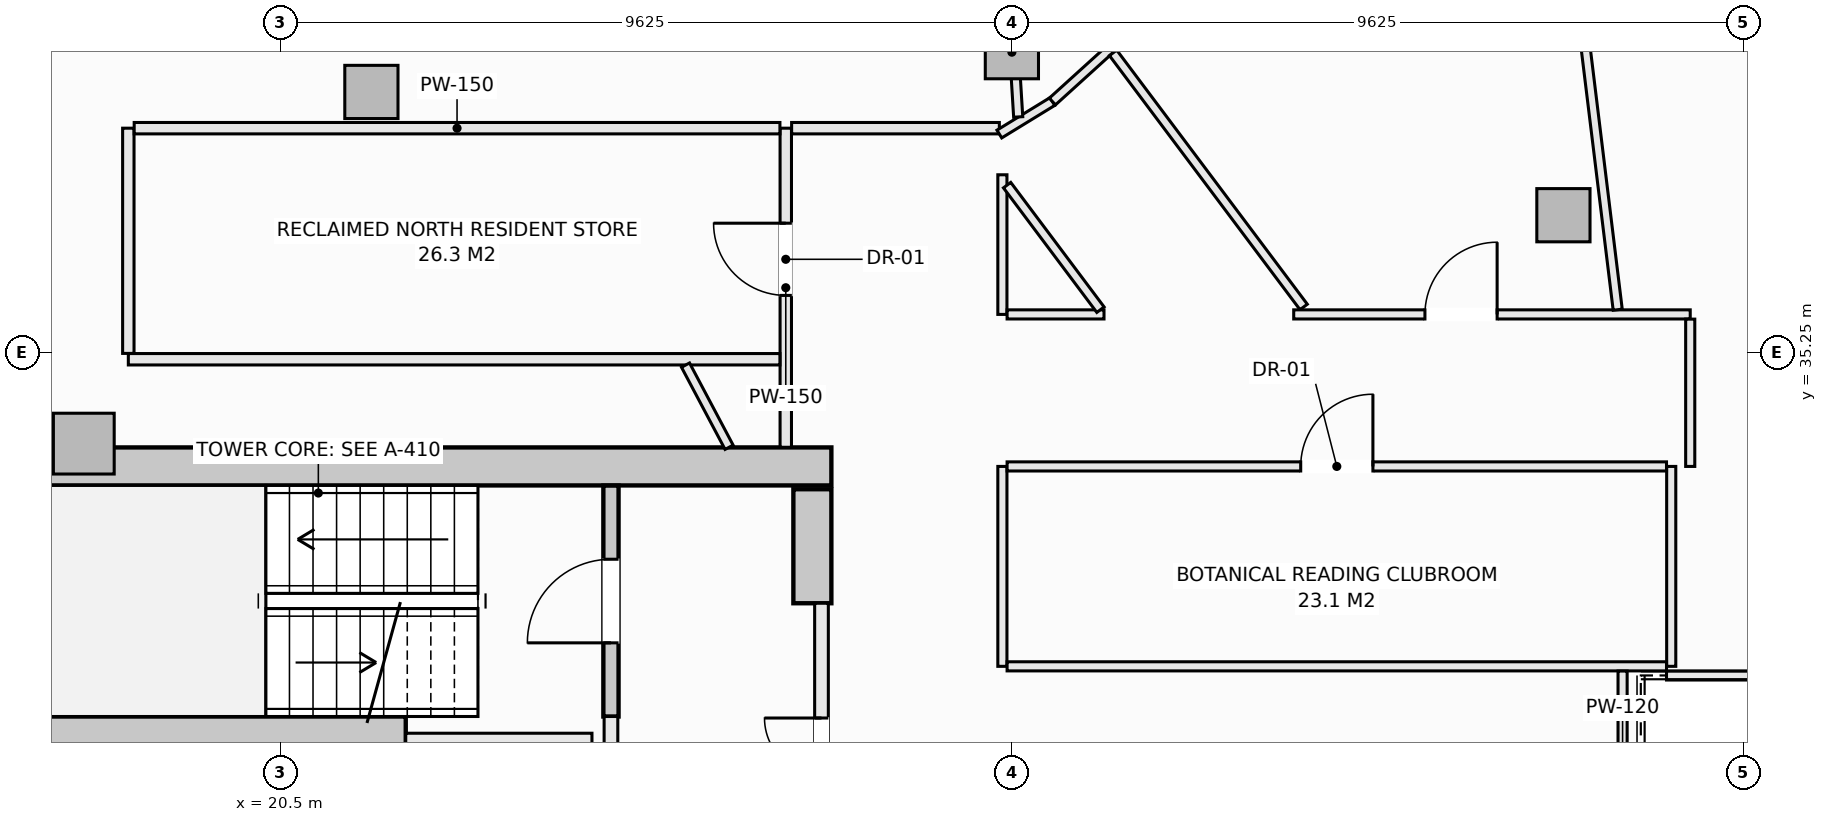
"""IFC4 building model, lengths in metres.
Left out: names, types, materials, properties, quantities, classifications, styles, units other than length and angle.
Written with IfcOpenShell. Run it as: python <this file> out.ifc"""

import sys

from ifc_helpers import new_model, si_unit, direction, frame, frame_2d, origin, origin_2d, place, context, subcontext, project, spatial, rectangle, extrude, element, fill, save


model = new_model("IFC4")
c1 = context("Model", 3, precision=1e-05, world=origin(), true_north=direction((0.0, 1.0)))
c2 = subcontext(c1, "Body", "Model", "MODEL_VIEW")
j1 = project(units=[si_unit("LENGTHUNIT", "METRE"), si_unit("PLANEANGLEUNIT", "RADIAN")], contexts=[c1])
p1 = place(None, origin())
s1 = spatial("IfcSite", under=j1, at=p1, CompositionType="ELEMENT")
p2 = place(p1, origin())
s2 = spatial("IfcBuilding", under=s1, at=p2, CompositionType="ELEMENT")
p3 = place(p2, frame((0.0, 0.0, 209.6)))
s3 = spatial("IfcBuildingStorey", under=s2, at=p3, CompositionType="ELEMENT", Elevation=209.6)
p4 = place(p3, frame((14.25, 33.75, -0.27), z_axis=(0.0, 0.0, 1.0), x_axis=(1.0, 0.0, 0.0)))
e1 = element("IfcWall", 1, at=p4, inside=s3, PredefinedType="SHEAR", context=c2, shape_type="SweptSolid", body=[
    extrude(rectangle(XDim=13.5, YDim=0.5, at=frame_2d((6.75, 0.0))), origin(), (0.0, 0.0, 1.0), 3.3),
])
p5 = place(p3, frame((27.5, 31.95, -0.27), z_axis=(0.0, 0.0, 1.0), x_axis=(0.0, 1.0, 0.0)))
e2 = element("IfcWall", 2, at=p5, inside=s3, PredefinedType="SHEAR", context=c2, shape_type="SweptSolid", body=[
    extrude(rectangle(XDim=1.5, YDim=0.5, at=frame_2d((0.75, 0.0))), origin(), (0.0, 0.0, 1.0), 3.3),
])
p6 = place(p3, frame((14.85, 30.25, -0.27), z_axis=(0.0, 0.0, 1.0), x_axis=(1.0, 0.0, 0.0)))
e3 = element("IfcWall", 3, at=p6, inside=s3, PredefinedType="SHEAR", context=c2, shape_type="SweptSolid", body=[
    extrude(rectangle(XDim=7.3, YDim=0.42, at=frame_2d((3.65, 0.0))), origin(), (0.0, 0.0, 1.0), 3.3),
])
for number, where, z_axis, x_axis in (
    (4, (37.382, 37.055, -0.27), (0.0, 0.0, 1.0), (1.0, 0.0, 0.0)),
    (5, (30.125, 39.2, -0.27), (0.0, 0.0, 1.0), (1.0, 0.0, 0.0)),
    (6, (21.698, 38.677, -0.27), (0.0, 0.0, 1.0), (1.0, 0.0, 0.0)),
):
    element("IfcColumn", number, at=place(p3, frame(where, z_axis=z_axis, x_axis=x_axis)), inside=s3, PredefinedType="COLUMN", context=c2, shape_type="SweptSolid", body=[
        extrude(rectangle(XDim=0.7, YDim=0.7, at=origin_2d()), origin(), (0.0, 0.0, 1.0), 3.3),
    ])
p7 = place(p3, frame((17.914, 34.05, -0.27), z_axis=(0.0, 0.0, 1.0), x_axis=(1.0, 0.0, 0.0)))
e7 = element("IfcColumn", 7, at=p7, inside=s3, PredefinedType="PILASTER", context=c2, shape_type="SweptSolid", body=[
    extrude(rectangle(XDim=0.8, YDim=0.8, at=origin_2d()), origin(), (0.0, 0.0, 1.0), 3.3),
])
p8 = place(p3, frame((24.85, 30.46, -0.27), z_axis=(0.0, 0.0, 1.0), x_axis=(0.0, 1.0, 0.0)))
e8 = element("IfcWall", 8, at=p8, inside=s3, PredefinedType="SHEAR", context=c2, shape_type="SweptSolid", body=[
    extrude(rectangle(XDim=3.038, YDim=0.2, at=frame_2d((1.519, 0.0))), origin(), (0.0, 0.0, 1.0), 3.3),
])
p9 = place(p8, frame((0.969, 0.0, 0.27)))
e9 = element("IfcOpeningElement", 9, at=p9, cuts=e8, PredefinedType="OPENING", context=c2, shape_type="SweptSolid", body=[
    extrude(rectangle(XDim=1.1, YDim=2.15, at=frame_2d((0.55, 1.075))), frame((0.0, 0.11, 0.0), z_axis=(0.0, -1.0, 0.0), x_axis=(1.0, 0.0, 0.0)), (0.0, 0.0, 1.0), 0.22),
])
p10 = place(p3, frame((22.15, 30.14, 0.0), z_axis=(0.0, 0.0, 1.0), x_axis=(1.0, 0.0, 0.0)))
e10 = element("IfcWall", 10, at=p10, inside=s3, PredefinedType="SOLIDWALL", context=c2, shape_type="SweptSolid", body=[
    extrude(rectangle(XDim=2.45, YDim=0.2, at=frame_2d((1.225, 0.0))), origin(), (0.0, 0.0, 1.0), 3.03),
])
p11 = place(p3, frame((24.85, 30.04, 0.0), z_axis=(0.0, 0.0, 1.0), x_axis=(0.0, 1.0, 0.0)))
e11 = element("IfcWall", 11, at=p11, inside=s3, PredefinedType="SOLIDWALL", context=c2, shape_type="SweptSolid", body=[
    extrude(rectangle(XDim=0.42, YDim=0.18, at=frame_2d((0.21, 0.0))), origin(), (0.0, 0.0, 1.0), 3.03),
])
p12 = place(p3, frame((27.62, 22.05, 0.0), z_axis=(0.0, 0.0, 1.0), x_axis=(0.0, 1.0, 0.0)))
e12 = element("IfcWall", 12, at=p12, inside=s3, PredefinedType="SOLIDWALL", context=c2, shape_type="SweptSolid", body=[
    extrude(rectangle(XDim=9.9, YDim=0.18, at=frame_2d((4.95, 0.0))), origin(), (0.0, 0.0, 1.0), 3.03),
])
p13 = place(p12, frame((4.475, 0.0, 0.0)))
e13 = element("IfcOpeningElement", 13, at=p13, cuts=e12, PredefinedType="OPENING", context=c2, shape_type="SweptSolid", body=[
    extrude(rectangle(XDim=0.95, YDim=2.1, at=frame_2d((0.475, 1.05))), frame((0.0, 0.1, 0.0), z_axis=(0.0, -1.0, 0.0), x_axis=(1.0, 0.0, 0.0)), (0.0, 0.0, 1.0), 0.2),
])
p14 = place(p12, frame((6.89, 0.0, 0.0)))
e14 = element("IfcOpeningElement", 14, at=p14, cuts=e12, PredefinedType="OPENING", context=c2, shape_type="SweptSolid", body=[
    extrude(rectangle(XDim=1.5, YDim=2.2, at=frame_2d((0.75, 1.1))), frame((0.0, 0.1, 0.0), z_axis=(0.0, -1.0, 0.0), x_axis=(1.0, 0.0, 0.0)), (0.0, 0.0, 1.0), 0.2),
])
p15 = place(p12, frame((1.51, 0.0, 0.0)))
e15 = element("IfcOpeningElement", 15, at=p15, cuts=e12, PredefinedType="OPENING", context=c2, shape_type="SweptSolid", body=[
    extrude(rectangle(XDim=1.5, YDim=2.2, at=frame_2d((0.75, 1.1))), frame((0.0, 0.1, 0.0), z_axis=(0.0, -1.0, 0.0), x_axis=(1.0, 0.0, 0.0)), (0.0, 0.0, 1.0), 0.2),
])
p16 = place(p3, frame((27.15, 34.002, 0.0), z_axis=(0.0, 0.0, 1.0), x_axis=(0.0, 1.0, 0.0)))
e16 = element("IfcWall", 16, at=p16, inside=s3, PredefinedType="PARTITIONING", context=c2, shape_type="SweptSolid", body=[
    extrude(rectangle(XDim=4.198, YDim=0.15, at=frame_2d((2.099, 0.0))), origin(), (0.0, 0.0, 1.0), 3.03),
])
p17 = place(p16, frame((1.998, 0.0, 0.0)))
e17 = element("IfcOpeningElement", 17, at=p17, cuts=e16, PredefinedType="OPENING", context=c2, shape_type="SweptSolid", body=[
    extrude(rectangle(XDim=0.95, YDim=2.1, at=frame_2d((0.475, 1.05))), frame((0.0, 0.085, 0.0), z_axis=(0.0, -1.0, 0.0), x_axis=(1.0, 0.0, 0.0)), (0.0, 0.0, 1.0), 0.17),
])
p18 = place(p3, frame((30.0, 31.12, 0.0), z_axis=(0.0, 0.0, 1.0), x_axis=(0.0, 1.0, 0.0)))
e18 = element("IfcWall", 18, at=p18, inside=s3, PredefinedType="PARTITIONING", context=c2, shape_type="SweptSolid", body=[
    extrude(rectangle(XDim=2.63, YDim=0.12, at=frame_2d((1.315, 0.0))), origin(), (0.0, 0.0, 1.0), 3.03),
])
p19 = place(p3, frame((30.0, 35.75, 0.0), z_axis=(0.0, 0.0, 1.0), x_axis=(0.0, 1.0, 0.0)))
e19 = element("IfcWall", 19, at=p19, inside=s3, PredefinedType="PARTITIONING", context=c2, shape_type="SweptSolid", body=[
    extrude(rectangle(XDim=1.837, YDim=0.12, at=frame_2d((0.918, 0.0))), origin(), (0.0, 0.0, 1.0), 3.03),
])
p20 = place(p3, frame((38.8, 31.12, 0.0), z_axis=(0.0, 0.0, 1.0), x_axis=(0.0, 1.0, 0.0)))
e20 = element("IfcWall", 20, at=p20, inside=s3, PredefinedType="PARTITIONING", context=c2, shape_type="SweptSolid", body=[
    extrude(rectangle(XDim=2.63, YDim=0.12, at=frame_2d((1.315, 0.0))), origin(), (0.0, 0.0, 1.0), 3.03),
])
p21 = place(p3, frame((30.062, 31.12, 0.0), z_axis=(0.0, 0.0, 1.0), x_axis=(1.0, 0.0, 0.0)))
e21 = element("IfcWall", 21, at=p21, inside=s3, PredefinedType="PARTITIONING", context=c2, shape_type="SweptSolid", body=[
    extrude(rectangle(XDim=8.676, YDim=0.12, at=frame_2d((4.338, 0.0))), origin(), (0.0, 0.0, 1.0), 3.03),
])
p22 = place(p3, frame((30.062, 33.75, 0.0), z_axis=(0.0, 0.0, 1.0), x_axis=(1.0, 0.0, 0.0)))
e22 = element("IfcWall", 22, at=p22, inside=s3, PredefinedType="PARTITIONING", context=c2, shape_type="SweptSolid", body=[
    extrude(rectangle(XDim=8.676, YDim=0.12, at=frame_2d((4.338, 0.0))), origin(), (0.0, 0.0, 1.0), 3.03),
])
p23 = place(p22, frame((3.863, 0.0, 0.0)))
e23 = element("IfcOpeningElement", 23, at=p23, cuts=e22, PredefinedType="OPENING", context=c2, shape_type="SweptSolid", body=[
    extrude(rectangle(XDim=0.95, YDim=2.1, at=frame_2d((0.475, 1.05))), frame((0.0, 0.07, 0.0), z_axis=(0.0, -1.0, 0.0), x_axis=(1.0, 0.0, 0.0)), (0.0, 0.0, 1.0), 0.14),
])
p24 = place(p3, frame((18.5, 35.16, 0.0), z_axis=(0.0, 0.0, 1.0), x_axis=(1.0, 0.0, 0.0)))
e24 = element("IfcWall", 24, at=p24, inside=s3, PredefinedType="PARTITIONING", context=c2, shape_type="SweptSolid", body=[
    extrude(rectangle(XDim=8.573, YDim=0.15, at=frame_2d((4.287, 0.0))), origin(), (0.0, 0.0, 1.0), 3.03),
])
p25 = place(p3, frame((18.5, 35.237, 0.0), z_axis=(0.0, 0.0, 1.0), x_axis=(0.0, 1.0, 0.0)))
e25 = element("IfcWall", 25, at=p25, inside=s3, PredefinedType="PARTITIONING", context=c2, shape_type="SweptSolid", body=[
    extrude(rectangle(XDim=2.963, YDim=0.15, at=frame_2d((1.481, 0.0))), origin(), (0.0, 0.0, 1.0), 3.03),
])
p26 = place(p3, frame((18.577, 38.2, 0.0), z_axis=(0.0, 0.0, 1.0), x_axis=(1.0, 0.0, 0.0)))
e26 = element("IfcWall", 26, at=p26, inside=s3, PredefinedType="PARTITIONING", context=c2, shape_type="SweptSolid", body=[
    extrude(rectangle(XDim=8.496, YDim=0.15, at=frame_2d((4.248, 0.0))), origin(), (0.0, 0.0, 1.0), 3.03),
])
p27 = place(p3, frame((27.227, 38.2, 0.0), z_axis=(0.0, 0.0, 1.0), x_axis=(1.0, 0.0, 0.0)))
e27 = element("IfcWall", 27, at=p27, inside=s3, PredefinedType="PARTITIONING", context=c2, shape_type="SweptSolid", body=[
    extrude(rectangle(XDim=2.733, YDim=0.15, at=frame_2d((1.366, 0.0))), origin(), (0.0, 0.0, 1.0), 3.03),
])
p28 = place(p3, frame((29.96, 38.123, 0.0), z_axis=(0.0, 0.0, 1.0), x_axis=(0.852506956574, 0.522715877885, 0.0)))
e28 = element("IfcWall", 28, at=p28, inside=s3, PredefinedType="PARTITIONING", context=c2, shape_type="SweptSolid", body=[
    extrude(rectangle(XDim=0.819, YDim=0.12, at=frame_2d((0.409, 0.0))), origin(), (0.0, 0.0, 1.0), 3.03),
])
p29 = place(p3, frame((30.658, 38.551, 0.0), z_axis=(0.0, 0.0, 1.0), x_axis=(0.74084279818, 0.671678456097, 0.0)))
e29 = element("IfcWall", 29, at=p29, inside=s3, PredefinedType="PARTITIONING", context=c2, shape_type="SweptSolid", body=[
    extrude(rectangle(XDim=1.027, YDim=0.12, at=frame_2d((0.514, 0.0))), origin(), (0.0, 0.0, 1.0), 3.03),
])
p30 = place(p3, frame((31.456, 39.191, 0.0), z_axis=(0.0, 0.0, 1.0), x_axis=(0.600056078533, -0.799957938029, 0.0)))
e30 = element("IfcWall", 30, at=p30, inside=s3, PredefinedType="PARTITIONING", context=c2, shape_type="SweptSolid", body=[
    extrude(rectangle(XDim=4.179, YDim=0.12, at=frame_2d((2.09, 0.0))), origin(), (0.0, 0.0, 1.0), 2.478),
])
p31 = place(p3, frame((30.062, 35.75, 0.0), z_axis=(0.0, 0.0, 1.0), x_axis=(1.0, 0.0, 0.0)))
e31 = element("IfcWall", 31, at=p31, inside=s3, PredefinedType="PARTITIONING", context=c2, shape_type="SweptSolid", body=[
    extrude(rectangle(XDim=1.275, YDim=0.12, at=frame_2d((0.637, 0.0))), origin(), (0.0, 0.0, 1.0), 3.03),
])
p32 = place(p3, frame((33.833, 35.75, 0.0), z_axis=(0.0, 0.0, 1.0), x_axis=(1.0, 0.0, 0.0)))
e32 = element("IfcWall", 32, at=p32, inside=s3, PredefinedType="PARTITIONING", context=c2, shape_type="SweptSolid", body=[
    extrude(rectangle(XDim=5.217, YDim=0.12, at=frame_2d((2.608, 0.0))), origin(), (0.0, 0.0, 1.0), 2.478),
])
p33 = place(p32, frame((1.726, 0.0, 0.0)))
e33 = element("IfcOpeningElement", 33, at=p33, cuts=e32, PredefinedType="OPENING", context=c2, shape_type="SweptSolid", body=[
    extrude(rectangle(XDim=0.95, YDim=2.1, at=frame_2d((0.475, 1.05))), frame((0.0, 0.07, 0.0), z_axis=(0.0, -1.0, 0.0), x_axis=(1.0, 0.0, 0.0)), (0.0, 0.0, 1.0), 0.14),
])
p34 = place(p3, frame((39.05, 33.75, 0.0), z_axis=(0.0, 0.0, 1.0), x_axis=(0.0, 1.0, 0.0)))
e34 = element("IfcWall", 34, at=p34, inside=s3, PredefinedType="PARTITIONING", context=c2, shape_type="SweptSolid", body=[
    extrude(rectangle(XDim=1.938, YDim=0.12, at=frame_2d((0.969, 0.0))), origin(), (0.0, 0.0, 1.0), 3.03),
])
p35 = place(p3, frame((38.16, 28.997, 0.0), z_axis=(0.0, 0.0, 1.0), x_axis=(0.0, 1.0, 0.0)))
e35 = element("IfcWall", 35, at=p35, inside=s3, PredefinedType="PARTITIONING", context=c2, shape_type="SweptSolid", body=[
    extrude(rectangle(XDim=2.061, YDim=0.12, at=frame_2d((1.031, 0.0))), origin(), (0.0, 0.0, 1.0), 3.03),
])
p36 = place(p3, frame((30.062, 37.451, 0.0), z_axis=(0.0, 0.0, 1.0), x_axis=(0.599790195836, -0.800157310145, 0.0)))
e36 = element("IfcWall", 36, at=p36, inside=s3, PredefinedType="PARTITIONING", context=c2, shape_type="SweptSolid", body=[
    extrude(rectangle(XDim=2.048, YDim=0.12, at=frame_2d((1.024, 0.0))), origin(), (0.0, 0.0, 1.0), 3.03),
])
p37 = place(p3, frame((29.702, 46.603, 0.0), z_axis=(0.0, 0.0, 1.0), x_axis=(0.06113767321, -0.998129342778, 0.0)))
e37 = element("IfcWall", 37, at=p37, inside=s3, PredefinedType="PARTITIONING", context=c2, shape_type="SweptSolid", body=[
    extrude(rectangle(XDim=8.27, YDim=0.12, at=frame_2d((4.135, 0.0))), origin(), (0.0, 0.0, 1.0), 2.712),
])
p38 = place(p3, frame((36.866, 45.854, 0.0), z_axis=(0.0, 0.0, 1.0), x_axis=(0.12152760456, -0.99258805218, 0.0)))
e38 = element("IfcWall", 38, at=p38, inside=s3, PredefinedType="PARTITIONING", context=c2, shape_type="SweptSolid", body=[
    extrude(rectangle(XDim=10.117, YDim=0.12, at=frame_2d((5.059, 0.0))), origin(), (0.0, 0.0, 1.0), 2.478),
])
p39 = place(p3, frame((38.738, 31.0, 0.0), z_axis=(0.0, 0.0, 1.0), x_axis=(1.0, 0.0, 0.0)))
e39 = element("IfcWall", 39, at=p39, inside=s3, PredefinedType="PARTITIONING", context=c2, shape_type="SweptSolid", body=[
    extrude(rectangle(XDim=5.3, YDim=0.12, at=frame_2d((2.65, 0.0))), origin(), (0.0, 0.0, 1.0), 3.03),
])
p40 = place(p3, frame((25.831, 35.083, 0.0), z_axis=(0.0, 0.0, 1.0), x_axis=(0.468630025993, -0.883394531757, 0.0)))
e40 = element("IfcWall", 40, at=p40, inside=s3, PredefinedType="PARTITIONING", context=c2, shape_type="SweptSolid", body=[
    extrude(rectangle(XDim=1.224, YDim=0.12, at=frame_2d((0.612, 0.0))), origin(), (0.0, 0.0, 1.0), 3.03),
])
p41 = place(p9, origin())
e41 = element("IfcDoor", 41, at=p41, inside=s3, OperationType="SINGLE_SWING_LEFT", PredefinedType="DOOR", context=c2, shape_type="SweptSolid", body=[
    extrude(rectangle(XDim=1.1, YDim=2.15, at=frame_2d((0.55, 1.075))), frame((0.0, 0.025, 0.0), z_axis=(0.0, -1.0, 0.0), x_axis=(1.0, 0.0, 0.0)), (0.0, 0.0, 1.0), 0.05),
])
fill(e9, e41)
p42 = place(p14, origin())
e42 = element("IfcDoor", 42, at=p42, inside=s3, OperationType="DOUBLE_DOOR_SINGLE_SWING", PredefinedType="DOOR", context=c2, shape_type="SweptSolid", body=[
    extrude(rectangle(XDim=1.5, YDim=2.2, at=frame_2d((0.75, 1.1))), frame((0.0, 0.025, 0.0), z_axis=(0.0, -1.0, 0.0), x_axis=(1.0, 0.0, 0.0)), (0.0, 0.0, 1.0), 0.05),
])
fill(e14, e42)
p43 = place(p23, origin())
e43 = element("IfcDoor", 43, at=p43, inside=s3, OperationType="SINGLE_SWING_RIGHT", PredefinedType="DOOR", context=c2, shape_type="SweptSolid", body=[
    extrude(rectangle(XDim=0.95, YDim=2.1, at=frame_2d((0.475, 1.05))), frame((0.0, 0.025, 0.0), z_axis=(0.0, -1.0, 0.0), x_axis=(1.0, 0.0, 0.0)), (0.0, 0.0, 1.0), 0.05),
])
fill(e23, e43)
p44 = place(p17, origin())
e44 = element("IfcDoor", 44, at=p44, inside=s3, OperationType="SINGLE_SWING_RIGHT", PredefinedType="DOOR", context=c2, shape_type="SweptSolid", body=[
    extrude(rectangle(XDim=0.95, YDim=2.1, at=frame_2d((0.475, 1.05))), frame((0.0, 0.025, 0.0), z_axis=(0.0, -1.0, 0.0), x_axis=(1.0, 0.0, 0.0)), (0.0, 0.0, 1.0), 0.05),
])
fill(e17, e44)
p45 = place(p33, origin())
e45 = element("IfcDoor", 45, at=p45, inside=s3, OperationType="SINGLE_SWING_RIGHT", PredefinedType="DOOR", context=c2, shape_type="SweptSolid", body=[
    extrude(rectangle(XDim=0.95, YDim=2.1, at=frame_2d((0.475, 1.05))), frame((0.0, 0.025, 0.0), z_axis=(0.0, -1.0, 0.0), x_axis=(1.0, 0.0, 0.0)), (0.0, 0.0, 1.0), 0.05),
])
fill(e33, e45)
save(model, sys.argv[1])
